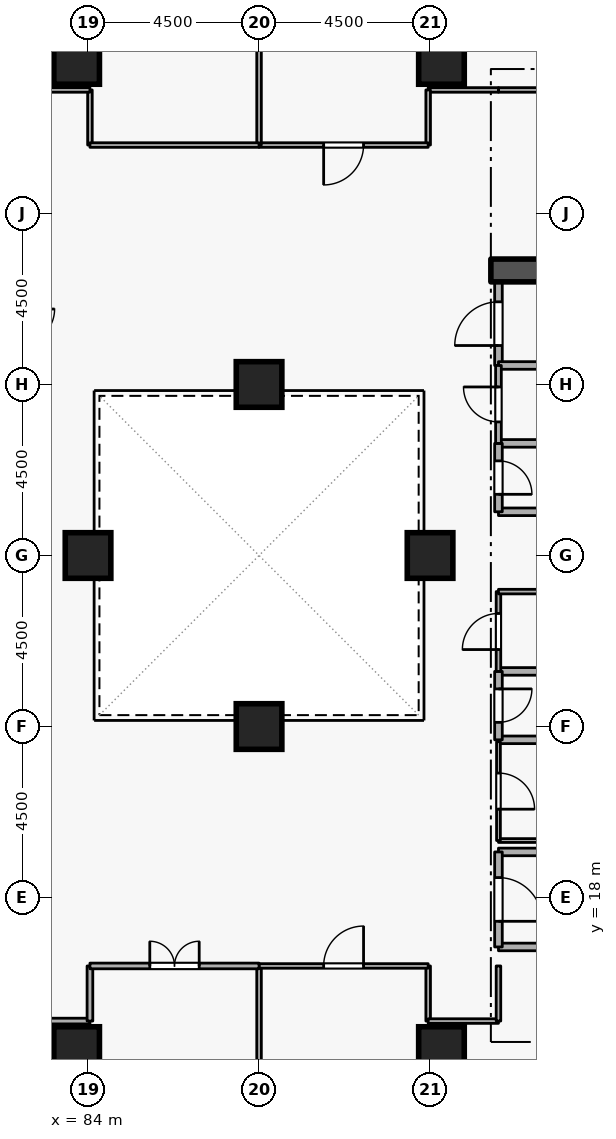
"""IFC4 building model, lengths in metres.
Left out: names, types, materials, properties, quantities, classifications, styles, units other than length and angle.
Written with IfcOpenShell. Run it as: python <this file> out.ifc"""

import sys

from ifc_helpers import new_model, si_unit, direction, frame, frame_2d, origin, origin_2d, place, context, subcontext, project, spatial, rectangle, extrude, element, fill, save


model = new_model("IFC4")
c1 = context("Model", 3, precision=1e-05, world=origin(), true_north=direction((0.0, 1.0)))
c2 = subcontext(c1, "Body", "Model", "MODEL_VIEW")
j1 = project(units=[si_unit("LENGTHUNIT", "METRE"), si_unit("PLANEANGLEUNIT", "RADIAN")], contexts=[c1])
p1 = place(None, origin())
s1 = spatial("IfcSite", under=j1, at=p1, CompositionType="ELEMENT")
p2 = place(p1, origin())
s2 = spatial("IfcBuilding", under=s1, at=p2, CompositionType="ELEMENT")
p3 = place(p2, frame((0.0, 0.0, 101.7)))
s3 = spatial("IfcBuildingStorey", under=s2, at=p3, CompositionType="ELEMENT", Elevation=101.7)
p4 = place(p3, frame((94.6, 34.5, 0.0), z_axis=(0.0, 0.0, 1.0), x_axis=(1.0, 0.0, 0.0)))
e1 = element("IfcWall", 1, at=p4, inside=s3, PredefinedType="SHEAR", context=c2, shape_type="SweptSolid", body=[
    extrude(rectangle(XDim=5.7, YDim=0.6, at=frame_2d((2.85, 0.0))), origin(), (0.0, 0.0, 1.0), 3.6),
])
for number, where, z_axis, x_axis in (
    (2, (93.3, 14.0, 0.0), (0.0, 0.0, 1.0), (1.0, 0.0, 0.0)),
    (3, (93.3, 40.0, 0.0), (0.0, 0.0, 1.0), (1.0, 0.0, 0.0)),
    (4, (83.7, 14.0, 0.0), (0.0, 0.0, 1.0), (1.0, 0.0, 0.0)),
    (5, (83.7, 40.0, 0.0), (0.0, 0.0, 1.0), (1.0, 0.0, 0.0)),
    (6, (93.0, 27.0, 0.0), (0.0, 0.0, 1.0), (1.0, 0.0, 0.0)),
    (7, (84.0, 27.0, 0.0), (0.0, 0.0, 1.0), (1.0, 0.0, 0.0)),
    (8, (88.5, 22.5, 0.0), (0.0, 0.0, 1.0), (1.0, 0.0, 0.0)),
    (9, (88.5, 31.5, 0.0), (0.0, 0.0, 1.0), (1.0, 0.0, 0.0)),
):
    element("IfcColumn", number, at=place(p3, frame(where, z_axis=z_axis, x_axis=x_axis)), inside=s3, PredefinedType="COLUMN", context=c2, shape_type="SweptSolid", body=[
        extrude(rectangle(XDim=1.2, YDim=1.2, at=origin_2d()), origin(), (0.0, 0.0, 1.0), 3.6),
    ])
p5 = place(p3, frame((94.8, 16.7, 0.0), z_axis=(0.0, 0.0, 1.0), x_axis=(1.0, 0.0, 0.0)))
e10 = element("IfcWall", 10, at=p5, inside=s3, PredefinedType="STANDARD", context=c2, shape_type="SweptSolid", body=[
    extrude(rectangle(XDim=5.7, YDim=0.2, at=frame_2d((2.85, 0.0))), origin(), (0.0, 0.0, 1.0), 3.34),
])
p6 = place(p3, frame((97.1, 19.2, 0.0), z_axis=(0.0, 0.0, 1.0), x_axis=(-1.0, 0.0, 0.0)))
e11 = element("IfcWall", 11, at=p6, inside=s3, PredefinedType="STANDARD", context=c2, shape_type="SweptSolid", body=[
    extrude(rectangle(XDim=2.3, YDim=0.2, at=frame_2d((1.15, 0.0))), origin(), (0.0, 0.0, 1.0), 2.545),
])
p7 = place(p3, frame((94.8, 19.2, 0.0), z_axis=(0.0, 0.0, 1.0), x_axis=(0.0, -1.0, 0.0)))
e12 = element("IfcWall", 12, at=p7, inside=s3, PredefinedType="STANDARD", context=c2, shape_type="SweptSolid", body=[
    extrude(rectangle(XDim=2.5, YDim=0.2, at=frame_2d((1.25, 0.0))), origin(), (0.0, 0.0, 1.0), 3.34),
])
p8 = place(p7, frame((0.675, 0.0, 0.0)))
e13 = element("IfcOpeningElement", 13, at=p8, cuts=e12, PredefinedType="OPENING", context=c2, shape_type="SweptSolid", body=[
    extrude(rectangle(XDim=1.15, YDim=2.1, at=frame_2d((0.575, 1.05))), frame((0.0, 0.11, 0.0), z_axis=(0.0, -1.0, 0.0), x_axis=(1.0, 0.0, 0.0)), (0.0, 0.0, 1.0), 0.22),
])
for number, where, z_axis, x_axis in (
    (14, (94.8, 28.15, 0.0), (0.0, 0.0, 1.0), (1.0, 0.0, 0.0)),
    (15, (96.85, 29.95, 0.0), (0.0, 0.0, 1.0), (-1.0, 0.0, 0.0)),
):
    element("IfcWall", number, at=place(p3, frame(where, z_axis=z_axis, x_axis=x_axis)), inside=s3, PredefinedType="STANDARD", context=c2, shape_type="SweptSolid", body=[
        extrude(rectangle(XDim=2.05, YDim=0.2, at=frame_2d((1.025, 0.0))), origin(), (0.0, 0.0, 1.0), 3.34),
    ])
p9 = place(p3, frame((94.8, 29.95, 0.0), z_axis=(0.0, 0.0, 1.0), x_axis=(0.0, -1.0, 0.0)))
e16 = element("IfcWall", 16, at=p9, inside=s3, PredefinedType="STANDARD", context=c2, shape_type="SweptSolid", body=[
    extrude(rectangle(XDim=1.8, YDim=0.2, at=frame_2d((0.9, 0.0))), origin(), (0.0, 0.0, 1.0), 3.34),
])
p10 = place(p9, frame((0.46, 0.0, 0.0)))
e17 = element("IfcOpeningElement", 17, at=p10, cuts=e16, PredefinedType="OPENING", context=c2, shape_type="SweptSolid", body=[
    extrude(rectangle(XDim=0.88, YDim=2.04, at=frame_2d((0.44, 1.02))), frame((0.0, 0.11, 0.0), z_axis=(0.0, -1.0, 0.0), x_axis=(1.0, 0.0, 0.0)), (0.0, 0.0, 1.0), 0.22),
])
for number, where, z_axis, x_axis in (
    (18, (94.8, 22.15, 0.0), (0.0, 0.0, 1.0), (1.0, 0.0, 0.0)),
    (19, (96.85, 23.95, 0.0), (0.0, 0.0, 1.0), (-1.0, 0.0, 0.0)),
):
    element("IfcWall", number, at=place(p3, frame(where, z_axis=z_axis, x_axis=x_axis)), inside=s3, PredefinedType="STANDARD", context=c2, shape_type="SweptSolid", body=[
        extrude(rectangle(XDim=2.05, YDim=0.2, at=frame_2d((1.025, 0.0))), origin(), (0.0, 0.0, 1.0), 3.34),
    ])
p11 = place(p3, frame((94.8, 23.95, 0.0), z_axis=(0.0, 0.0, 1.0), x_axis=(0.0, -1.0, 0.0)))
e20 = element("IfcWall", 20, at=p11, inside=s3, PredefinedType="STANDARD", context=c2, shape_type="SweptSolid", body=[
    extrude(rectangle(XDim=1.8, YDim=0.2, at=frame_2d((0.9, 0.0))), origin(), (0.0, 0.0, 1.0), 3.34),
])
p12 = place(p11, frame((0.46, 0.0, 0.0)))
e21 = element("IfcOpeningElement", 21, at=p12, cuts=e20, PredefinedType="OPENING", context=c2, shape_type="SweptSolid", body=[
    extrude(rectangle(XDim=0.88, YDim=2.04, at=frame_2d((0.44, 1.02))), frame((0.0, 0.11, 0.0), z_axis=(0.0, -1.0, 0.0), x_axis=(1.0, 0.0, 0.0)), (0.0, 0.0, 1.0), 0.22),
])
p13 = place(p3, frame((94.8, 32.0, 0.0), z_axis=(0.0, 0.0, 1.0), x_axis=(0.0, 1.0, 0.0)))
e22 = element("IfcWall", 22, at=p13, inside=s3, PredefinedType="STANDARD", context=c2, shape_type="SweptSolid", body=[
    extrude(rectangle(XDim=2.2, YDim=0.2, at=frame_2d((1.1, 0.0))), origin(), (0.0, 0.0, 1.0), 3.34),
])
p14 = place(p13, frame((0.525, 0.0, 0.0)))
e23 = element("IfcOpeningElement", 23, at=p14, cuts=e22, PredefinedType="OPENING", context=c2, shape_type="SweptSolid", body=[
    extrude(rectangle(XDim=1.15, YDim=2.1, at=frame_2d((0.575, 1.05))), frame((0.0, 0.11, 0.0), z_axis=(0.0, -1.0, 0.0), x_axis=(1.0, 0.0, 0.0)), (0.0, 0.0, 1.0), 0.22),
])
p15 = place(p3, frame((96.85, 32.0, 0.0), z_axis=(0.0, 0.0, 1.0), x_axis=(-1.0, 0.0, 0.0)))
e24 = element("IfcWall", 24, at=p15, inside=s3, PredefinedType="STANDARD", context=c2, shape_type="SweptSolid", body=[
    extrude(rectangle(XDim=2.05, YDim=0.2, at=frame_2d((1.025, 0.0))), origin(), (0.0, 0.0, 1.0), 3.34),
])
p16 = place(p3, frame((94.8, 19.5, 0.0), z_axis=(0.0, 0.0, 1.0), x_axis=(1.0, 0.0, 0.0)))
e25 = element("IfcWall", 25, at=p16, inside=s3, PredefinedType="PARTITIONING", context=c2, shape_type="SweptSolid", body=[
    extrude(rectangle(XDim=2.05, YDim=0.1, at=frame_2d((1.025, 0.0))), origin(), (0.0, 0.0, 1.0), 2.545),
])
p17 = place(p3, frame((94.8, 22.1, 0.0), z_axis=(0.0, 0.0, 1.0), x_axis=(0.0, -1.0, 0.0)))
e26 = element("IfcWall", 26, at=p17, inside=s3, PredefinedType="PARTITIONING", context=c2, shape_type="SweptSolid", body=[
    extrude(rectangle(XDim=2.6, YDim=0.1, at=frame_2d((1.3, 0.0))), origin(), (0.0, 0.0, 1.0), 3.34),
])
p18 = place(p17, frame((0.825, 0.0, 0.0)))
e27 = element("IfcOpeningElement", 27, at=p18, cuts=e26, PredefinedType="OPENING", context=c2, shape_type="SweptSolid", body=[
    extrude(rectangle(XDim=0.95, YDim=2.1, at=frame_2d((0.475, 1.05))), frame((0.0, 0.06, 0.0), z_axis=(0.0, -1.0, 0.0), x_axis=(1.0, 0.0, 0.0)), (0.0, 0.0, 1.0), 0.12),
])
p19 = place(p3, frame((94.8, 23.95, 0.0), z_axis=(0.0, 0.0, 1.0), x_axis=(0.0, 1.0, 0.0)))
e28 = element("IfcWall", 28, at=p19, inside=s3, PredefinedType="PARTITIONING", context=c2, shape_type="SweptSolid", body=[
    extrude(rectangle(XDim=2.1, YDim=0.12, at=frame_2d((1.05, 0.0))), origin(), (0.0, 0.0, 1.0), 3.34),
])
p20 = place(p19, frame((0.575, 0.0, 0.0)))
e29 = element("IfcOpeningElement", 29, at=p20, cuts=e28, PredefinedType="OPENING", context=c2, shape_type="SweptSolid", body=[
    extrude(rectangle(XDim=0.95, YDim=2.1, at=frame_2d((0.475, 1.05))), frame((0.0, 0.07, 0.0), z_axis=(0.0, -1.0, 0.0), x_axis=(1.0, 0.0, 0.0)), (0.0, 0.0, 1.0), 0.14),
])
p21 = place(p3, frame((94.8, 26.05, 0.0), z_axis=(0.0, 0.0, 1.0), x_axis=(1.0, 0.0, 0.0)))
e30 = element("IfcWall", 30, at=p21, inside=s3, PredefinedType="PARTITIONING", context=c2, shape_type="SweptSolid", body=[
    extrude(rectangle(XDim=2.05, YDim=0.12, at=frame_2d((1.025, 0.0))), origin(), (0.0, 0.0, 1.0), 3.34),
])
p22 = place(p3, frame((94.8, 29.95, 0.0), z_axis=(0.0, 0.0, 1.0), x_axis=(0.0, 1.0, 0.0)))
e31 = element("IfcWall", 31, at=p22, inside=s3, PredefinedType="PARTITIONING", context=c2, shape_type="SweptSolid", body=[
    extrude(rectangle(XDim=2.05, YDim=0.15, at=frame_2d((1.025, 0.0))), origin(), (0.0, 0.0, 1.0), 3.34),
])
p23 = place(p22, frame((0.565, 0.0, 0.0)))
e32 = element("IfcOpeningElement", 32, at=p23, cuts=e31, PredefinedType="OPENING", context=c2, shape_type="SweptSolid", body=[
    extrude(rectangle(XDim=0.92, YDim=2.08, at=frame_2d((0.46, 1.04))), frame((0.0, 0.085, 0.0), z_axis=(0.0, -1.0, 0.0), x_axis=(1.0, 0.0, 0.0)), (0.0, 0.0, 1.0), 0.17),
])
p24 = place(p3, frame((92.95, 16.2, 0.0), z_axis=(0.0, 0.0, 1.0), x_axis=(0.0, -1.0, 0.0)))
e33 = element("IfcWall", 33, at=p24, inside=s3, PredefinedType="PARTITIONING", context=c2, shape_type="SweptSolid", body=[
    extrude(rectangle(XDim=1.45, YDim=0.12, at=frame_2d((0.725, 0.0))), origin(), (0.0, 0.0, 1.0), 3.34),
])
p25 = place(p3, frame((92.95, 14.75, 0.0), z_axis=(0.0, 0.0, 1.0), x_axis=(1.0, 0.0, 0.0)))
e34 = element("IfcWall", 34, at=p25, inside=s3, PredefinedType="PARTITIONING", context=c2, shape_type="SweptSolid", body=[
    extrude(rectangle(XDim=1.85, YDim=0.12, at=frame_2d((0.925, 0.0))), origin(), (0.0, 0.0, 1.0), 3.34),
])
p26 = place(p3, frame((94.8, 14.75, 0.0), z_axis=(0.0, 0.0, 1.0), x_axis=(0.0, 1.0, 0.0)))
e35 = element("IfcWall", 35, at=p26, inside=s3, PredefinedType="PARTITIONING", context=c2, shape_type="SweptSolid", body=[
    extrude(rectangle(XDim=1.45, YDim=0.12, at=frame_2d((0.725, 0.0))), origin(), (0.0, 0.0, 1.0), 3.34),
])
p27 = place(p3, frame((88.5, 3.08, 0.0), z_axis=(0.0, 0.0, 1.0), x_axis=(0.0, 1.0, 0.0)))
e36 = element("IfcWall", 36, at=p27, inside=s3, PredefinedType="PARTITIONING", context=c2, shape_type="SweptSolid", body=[
    extrude(rectangle(XDim=13.12, YDim=0.12, at=frame_2d((6.56, 0.0))), origin(), (0.0, 0.0, 1.0), 2.878),
])
p28 = place(p3, frame((88.5, 16.2, 0.0), z_axis=(0.0, 0.0, 1.0), x_axis=(1.0, 0.0, 0.0)))
e37 = element("IfcWall", 37, at=p28, inside=s3, PredefinedType="PARTITIONING", context=c2, shape_type="SweptSolid", body=[
    extrude(rectangle(XDim=4.45, YDim=0.12, at=frame_2d((2.225, 0.0))), origin(), (0.0, 0.0, 1.0), 3.34),
])
p29 = place(p28, frame((1.7, 0.0, 0.0)))
e38 = element("IfcOpeningElement", 38, at=p29, cuts=e37, PredefinedType="OPENING", context=c2, shape_type="SweptSolid", body=[
    extrude(rectangle(XDim=1.05, YDim=2.1, at=frame_2d((0.525, 1.05))), frame((0.0, 0.07, 0.0), z_axis=(0.0, -1.0, 0.0), x_axis=(1.0, 0.0, 0.0)), (0.0, 0.0, 1.0), 0.14),
])
p30 = place(p3, frame((82.2, 14.75, 0.0), z_axis=(0.0, 0.0, 1.0), x_axis=(1.0, 0.0, 0.0)))
e39 = element("IfcWall", 39, at=p30, inside=s3, PredefinedType="PARTITIONING", context=c2, shape_type="SweptSolid", body=[
    extrude(rectangle(XDim=1.85, YDim=0.15, at=frame_2d((0.925, 0.0))), origin(), (0.0, 0.0, 1.0), 3.34),
])
p31 = place(p3, frame((84.05, 14.75, 0.0), z_axis=(0.0, 0.0, 1.0), x_axis=(0.0, 1.0, 0.0)))
e40 = element("IfcWall", 40, at=p31, inside=s3, PredefinedType="PARTITIONING", context=c2, shape_type="SweptSolid", body=[
    extrude(rectangle(XDim=1.45, YDim=0.15, at=frame_2d((0.725, 0.0))), origin(), (0.0, 0.0, 1.0), 3.34),
])
p32 = place(p3, frame((84.05, 16.2, 0.0), z_axis=(0.0, 0.0, 1.0), x_axis=(1.0, 0.0, 0.0)))
e41 = element("IfcWall", 41, at=p32, inside=s3, PredefinedType="PARTITIONING", context=c2, shape_type="SweptSolid", body=[
    extrude(rectangle(XDim=4.45, YDim=0.15, at=frame_2d((2.225, 0.0))), origin(), (0.0, 0.0, 1.0), 3.34),
])
p33 = place(p32, frame((1.575, 0.0, 0.0)))
e42 = element("IfcOpeningElement", 42, at=p33, cuts=e41, PredefinedType="OPENING", context=c2, shape_type="SweptSolid", body=[
    extrude(rectangle(XDim=1.3, YDim=2.12, at=frame_2d((0.65, 1.06))), frame((0.0, 0.085, 0.0), z_axis=(0.0, -1.0, 0.0), x_axis=(1.0, 0.0, 0.0)), (0.0, 0.0, 1.0), 0.17),
])
p34 = place(p3, frame((97.95, 39.25, 0.0), z_axis=(0.0, 0.0, 1.0), x_axis=(-1.0, 0.0, 0.0)))
e43 = element("IfcWall", 43, at=p34, inside=s3, PredefinedType="PARTITIONING", context=c2, shape_type="SweptSolid", body=[
    extrude(rectangle(XDim=3.15, YDim=0.12, at=frame_2d((1.575, 0.0))), origin(), (0.0, 0.0, 1.0), 3.34),
])
p35 = place(p3, frame((94.8, 39.25, 0.0), z_axis=(0.0, 0.0, 1.0), x_axis=(-1.0, 0.0, 0.0)))
e44 = element("IfcWall", 44, at=p35, inside=s3, PredefinedType="PARTITIONING", context=c2, shape_type="SweptSolid", body=[
    extrude(rectangle(XDim=1.85, YDim=0.12, at=frame_2d((0.925, 0.0))), origin(), (0.0, 0.0, 1.0), 3.34),
])
p36 = place(p3, frame((92.95, 39.25, 0.0), z_axis=(0.0, 0.0, 1.0), x_axis=(0.0, -1.0, 0.0)))
e45 = element("IfcWall", 45, at=p36, inside=s3, PredefinedType="PARTITIONING", context=c2, shape_type="SweptSolid", body=[
    extrude(rectangle(XDim=1.45, YDim=0.12, at=frame_2d((0.725, 0.0))), origin(), (0.0, 0.0, 1.0), 3.34),
])
p37 = place(p3, frame((92.95, 37.8, 0.0), z_axis=(0.0, 0.0, 1.0), x_axis=(-1.0, 0.0, 0.0)))
e46 = element("IfcWall", 46, at=p37, inside=s3, PredefinedType="PARTITIONING", context=c2, shape_type="SweptSolid", body=[
    extrude(rectangle(XDim=4.45, YDim=0.12, at=frame_2d((2.225, 0.0))), origin(), (0.0, 0.0, 1.0), 3.34),
])
p38 = place(p37, frame((1.7, 0.0, 0.0)))
e47 = element("IfcOpeningElement", 47, at=p38, cuts=e46, PredefinedType="OPENING", context=c2, shape_type="SweptSolid", body=[
    extrude(rectangle(XDim=1.05, YDim=2.1, at=frame_2d((0.525, 1.05))), frame((0.0, 0.07, 0.0), z_axis=(0.0, -1.0, 0.0), x_axis=(1.0, 0.0, 0.0)), (0.0, 0.0, 1.0), 0.14),
])
p39 = place(p3, frame((88.5, 37.8, 0.0), z_axis=(0.0, 0.0, 1.0), x_axis=(0.0, 1.0, 0.0)))
e48 = element("IfcWall", 48, at=p39, inside=s3, PredefinedType="PARTITIONING", context=c2, shape_type="SweptSolid", body=[
    extrude(rectangle(XDim=7.12, YDim=0.12, at=frame_2d((3.56, 0.0))), origin(), (0.0, 0.0, 1.0), 2.878),
])
p40 = place(p3, frame((84.05, 37.8, 0.0), z_axis=(0.0, 0.0, 1.0), x_axis=(0.0, 1.0, 0.0)))
e49 = element("IfcWall", 49, at=p40, inside=s3, PredefinedType="PARTITIONING", context=c2, shape_type="SweptSolid", body=[
    extrude(rectangle(XDim=1.45, YDim=0.12, at=frame_2d((0.725, 0.0))), origin(), (0.0, 0.0, 1.0), 3.34),
])
p41 = place(p3, frame((84.05, 39.25, 0.0), z_axis=(0.0, 0.0, 1.0), x_axis=(-1.0, 0.0, 0.0)))
e50 = element("IfcWall", 50, at=p41, inside=s3, PredefinedType="PARTITIONING", context=c2, shape_type="SweptSolid", body=[
    extrude(rectangle(XDim=1.85, YDim=0.12, at=frame_2d((0.925, 0.0))), origin(), (0.0, 0.0, 1.0), 3.34),
])
p42 = place(p3, frame((88.5, 37.8, 0.0), z_axis=(0.0, 0.0, 1.0), x_axis=(-1.0, 0.0, 0.0)))
e51 = element("IfcWall", 51, at=p42, inside=s3, PredefinedType="PARTITIONING", context=c2, shape_type="SweptSolid", body=[
    extrude(rectangle(XDim=4.45, YDim=0.12, at=frame_2d((2.225, 0.0))), origin(), (0.0, 0.0, 1.0), 3.34),
])
p43 = place(p8, origin())
e52 = element("IfcDoor", 52, at=p43, inside=s3, OperationType="SINGLE_SWING_RIGHT", PredefinedType="DOOR", context=c2, shape_type="SweptSolid", body=[
    extrude(rectangle(XDim=1.15, YDim=2.1, at=frame_2d((0.575, 1.05))), frame((0.0, 0.025, 0.0), z_axis=(0.0, -1.0, 0.0), x_axis=(1.0, 0.0, 0.0)), (0.0, 0.0, 1.0), 0.05),
])
fill(e13, e52)
p44 = place(p10, origin())
e53 = element("IfcDoor", 53, at=p44, inside=s3, OperationType="SINGLE_SWING_RIGHT", PredefinedType="DOOR", context=c2, shape_type="SweptSolid", body=[
    extrude(rectangle(XDim=0.88, YDim=2.04, at=frame_2d((0.44, 1.02))), frame((0.0, 0.025, 0.0), z_axis=(0.0, -1.0, 0.0), x_axis=(1.0, 0.0, 0.0)), (0.0, 0.0, 1.0), 0.05),
])
fill(e17, e53)
p45 = place(p12, origin())
e54 = element("IfcDoor", 54, at=p45, inside=s3, OperationType="SINGLE_SWING_LEFT", PredefinedType="DOOR", context=c2, shape_type="SweptSolid", body=[
    extrude(rectangle(XDim=0.88, YDim=2.04, at=frame_2d((0.44, 1.02))), frame((0.0, 0.025, 0.0), z_axis=(0.0, -1.0, 0.0), x_axis=(1.0, 0.0, 0.0)), (0.0, 0.0, 1.0), 0.05),
])
fill(e21, e54)
p46 = place(p18, origin())
e55 = element("IfcDoor", 55, at=p46, inside=s3, OperationType="SINGLE_SWING_RIGHT", PredefinedType="DOOR", context=c2, shape_type="SweptSolid", body=[
    extrude(rectangle(XDim=0.95, YDim=2.1, at=frame_2d((0.475, 1.05))), frame((0.0, 0.025, 0.0), z_axis=(0.0, -1.0, 0.0), x_axis=(1.0, 0.0, 0.0)), (0.0, 0.0, 1.0), 0.05),
])
fill(e27, e55)
p47 = place(p20, origin())
e56 = element("IfcDoor", 56, at=p47, inside=s3, OperationType="SINGLE_SWING_LEFT", PredefinedType="DOOR", context=c2, shape_type="SweptSolid", body=[
    extrude(rectangle(XDim=0.95, YDim=2.1, at=frame_2d((0.475, 1.05))), frame((0.0, 0.025, 0.0), z_axis=(0.0, -1.0, 0.0), x_axis=(1.0, 0.0, 0.0)), (0.0, 0.0, 1.0), 0.05),
])
fill(e29, e56)
p48 = place(p23, origin())
e57 = element("IfcDoor", 57, at=p48, inside=s3, OperationType="SINGLE_SWING_RIGHT", PredefinedType="DOOR", context=c2, shape_type="SweptSolid", body=[
    extrude(rectangle(XDim=0.92, YDim=2.08, at=frame_2d((0.46, 1.04))), frame((0.0, 0.025, 0.0), z_axis=(0.0, -1.0, 0.0), x_axis=(1.0, 0.0, 0.0)), (0.0, 0.0, 1.0), 0.05),
])
fill(e32, e57)
p49 = place(p14, origin())
e58 = element("IfcDoor", 58, at=p49, inside=s3, OperationType="SINGLE_SWING_LEFT", PredefinedType="DOOR", context=c2, shape_type="SweptSolid", body=[
    extrude(rectangle(XDim=1.15, YDim=2.1, at=frame_2d((0.575, 1.05))), frame((0.0, 0.025, 0.0), z_axis=(0.0, -1.0, 0.0), x_axis=(1.0, 0.0, 0.0)), (0.0, 0.0, 1.0), 0.05),
])
fill(e23, e58)
p50 = place(p29, origin())
e59 = element("IfcDoor", 59, at=p50, inside=s3, OperationType="SINGLE_SWING_RIGHT", PredefinedType="DOOR", context=c2, shape_type="SweptSolid", body=[
    extrude(rectangle(XDim=1.05, YDim=2.1, at=frame_2d((0.525, 1.05))), frame((0.0, 0.025, 0.0), z_axis=(0.0, -1.0, 0.0), x_axis=(1.0, 0.0, 0.0)), (0.0, 0.0, 1.0), 0.05),
])
fill(e38, e59)
p51 = place(p33, origin())
e60 = element("IfcDoor", 60, at=p51, inside=s3, OperationType="DOUBLE_DOOR_SINGLE_SWING", PredefinedType="DOOR", context=c2, shape_type="SweptSolid", body=[
    extrude(rectangle(XDim=1.3, YDim=2.12, at=frame_2d((0.65, 1.06))), frame((0.0, 0.025, 0.0), z_axis=(0.0, -1.0, 0.0), x_axis=(1.0, 0.0, 0.0)), (0.0, 0.0, 1.0), 0.05),
])
fill(e42, e60)
p52 = place(p38, origin())
e61 = element("IfcDoor", 61, at=p52, inside=s3, OperationType="SINGLE_SWING_RIGHT", PredefinedType="DOOR", context=c2, shape_type="SweptSolid", body=[
    extrude(rectangle(XDim=1.05, YDim=2.1, at=frame_2d((0.525, 1.05))), frame((0.0, 0.025, 0.0), z_axis=(0.0, -1.0, 0.0), x_axis=(1.0, 0.0, 0.0)), (0.0, 0.0, 1.0), 0.05),
])
fill(e47, e61)
save(model, sys.argv[1])
